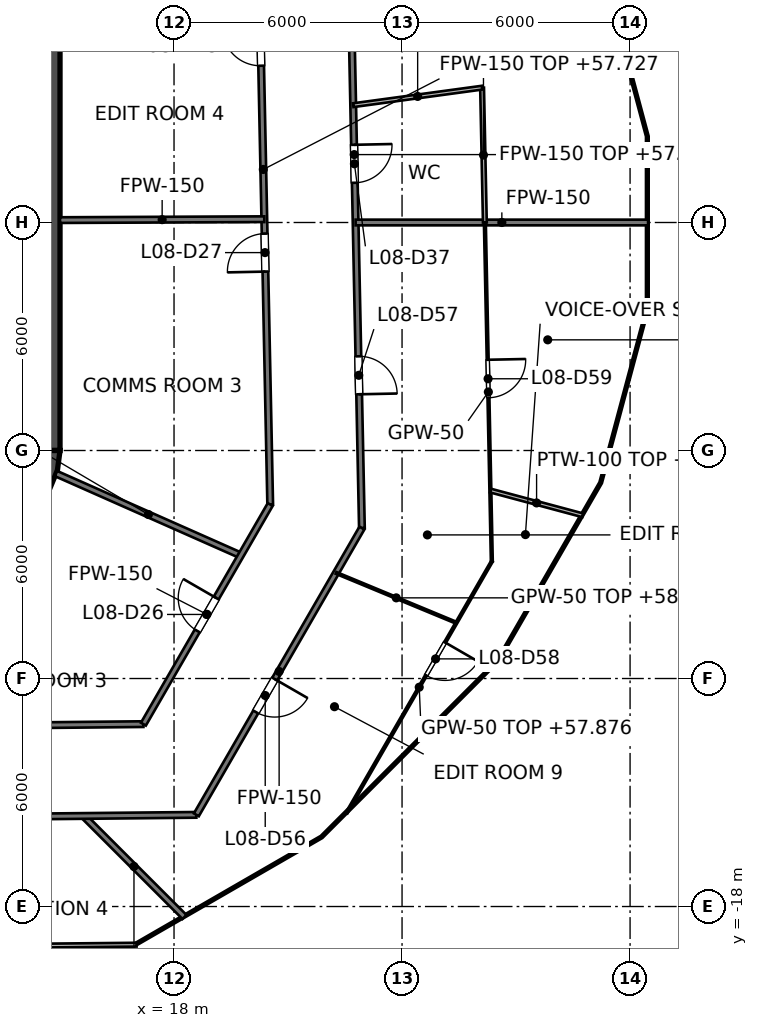
"""IFC4 building model, lengths in metres.
Left out: names, types, materials, properties, quantities, classifications, styles, units other than length and angle.
Written with IfcOpenShell. Run it as: python <this file> out.ifc"""

import sys

from ifc_helpers import new_model, si_unit, direction, frame, frame_2d, origin, place, context, subcontext, project, spatial, polyline, rectangle, outline, extrude, element, fill, save


model = new_model("IFC4")
c1 = context("Model", 3, precision=1e-05, world=origin(), true_north=direction((0.0, 1.0)))
c2 = subcontext(c1, "Body", "Model", "MODEL_VIEW")
j1 = project(units=[si_unit("LENGTHUNIT", "METRE"), si_unit("PLANEANGLEUNIT", "RADIAN")], contexts=[c1])
p1 = place(None, origin())
s1 = spatial("IfcSite", under=j1, at=p1, CompositionType="ELEMENT")
p2 = place(p1, origin())
s2 = spatial("IfcBuilding", under=s1, at=p2, CompositionType="ELEMENT")
p3 = place(p2, frame((0.0, 0.0, 54.6)))
s3 = spatial("IfcBuildingStorey", under=s2, at=p3, CompositionType="ELEMENT", Elevation=54.6)
p4 = place(p3, frame((14.7, -6.0, 0.0), z_axis=(0.0, 0.0, 1.0), x_axis=(0.0, 1.0, 0.0)))
e1 = element("IfcWall", 1, at=p4, inside=s3, PredefinedType="SHEAR", context=c2, shape_type="SweptSolid", body=[
    extrude(rectangle(XDim=12.0, YDim=0.6, at=frame_2d((6.0, 0.0))), origin(), (0.0, 0.0, 1.0), 4.2),
])
p5 = place(p3, origin())
e2 = element("IfcWall", 2, at=p5, inside=s3, PredefinedType="SHEAR", context=c2, shape_type="SweptSolid", body=[
    extrude(outline(polyline([(15.0, -6.0), (14.395, -6.0), (14.347, -6.361), (14.208, -6.698), (13.986, -6.986), (13.698, -7.208), (13.361, -7.347), (13.0, -7.395), (13.0, -8.0), (13.518, -7.932), (14.0, -7.732), (14.414, -7.414), (14.732, -7.0), (14.932, -6.518), (15.0, -6.0)])), origin(), (0.0, 0.0, 1.0), 4.2),
])
p6 = place(p3, frame((20.167, 10.213, 0.0), z_axis=(0.0, 0.0, 1.0), x_axis=(0.020624730832, -0.999787287616, 0.0)))
e3 = element("IfcWall", 3, at=p6, inside=s3, PredefinedType="PARTITIONING", context=c2, shape_type="SweptSolid", body=[
    extrude(rectangle(XDim=17.637, YDim=0.15, at=frame_2d((8.819, 0.0))), origin(), (0.0, 0.0, 1.0), 3.127),
])
p7 = place(p6, frame((10.508, 0.0, 0.0)))
e4 = element("IfcOpeningElement", 4, at=p7, cuts=e3, PredefinedType="OPENING", context=c2, shape_type="SweptSolid", body=[
    extrude(rectangle(XDim=1.0, YDim=2.1, at=frame_2d((0.5, 1.05))), frame((0.0, 0.075, 0.0), z_axis=(0.0, -1.0, 0.0), x_axis=(1.0, 0.0, 0.0)), (0.0, 0.0, 1.0), 0.15),
])
p8 = place(p6, frame((5.089, 0.0, 0.0)))
e5 = element("IfcOpeningElement", 5, at=p8, cuts=e3, PredefinedType="OPENING", context=c2, shape_type="SweptSolid", body=[
    extrude(rectangle(XDim=1.0, YDim=2.1, at=frame_2d((0.5, 1.05))), frame((0.0, 0.075, 0.0), z_axis=(0.0, -1.0, 0.0), x_axis=(1.0, 0.0, 0.0)), (0.0, 0.0, 1.0), 0.15),
])
p9 = place(p3, frame((22.539, 11.615, 0.0), z_axis=(0.0, 0.0, 1.0), x_axis=(0.020613919434, -0.999787510587, 0.0)))
e6 = element("IfcWall", 6, at=p9, inside=s3, PredefinedType="PARTITIONING", context=c2, shape_type="SweptSolid", body=[
    extrude(rectangle(XDim=19.66, YDim=0.15, at=frame_2d((9.83, 0.0))), origin(), (0.0, 0.0, 1.0), 3.127),
])
p10 = place(p9, frame((9.573, 0.0, 0.0)))
e7 = element("IfcOpeningElement", 7, at=p10, cuts=e6, PredefinedType="OPENING", context=c2, shape_type="SweptSolid", body=[
    extrude(rectangle(XDim=1.0, YDim=2.1, at=frame_2d((0.5, 1.05))), frame((0.0, 0.075, 0.0), z_axis=(0.0, -1.0, 0.0), x_axis=(1.0, 0.0, 0.0)), (0.0, 0.0, 1.0), 0.15),
])
p11 = place(p9, frame((15.139, 0.0, 0.0)))
e8 = element("IfcOpeningElement", 8, at=p11, cuts=e6, PredefinedType="OPENING", context=c2, shape_type="SweptSolid", body=[
    extrude(rectangle(XDim=1.0, YDim=2.1, at=frame_2d((0.5, 1.05))), frame((0.0, 0.075, 0.0), z_axis=(0.0, -1.0, 0.0), x_axis=(1.0, 0.0, 0.0)), (0.0, 0.0, 1.0), 0.15),
])
p12 = place(p3, frame((15.617, -15.617, 0.0), z_axis=(0.0, 0.0, 1.0), x_axis=(0.707106781187, -0.707106781187, 0.0)))
e9 = element("IfcWall", 9, at=p12, inside=s3, PredefinedType="PARTITIONING", context=c2, shape_type="SweptSolid", body=[
    extrude(rectangle(XDim=3.759, YDim=0.15, at=frame_2d((1.879, 0.0))), origin(), (0.0, 0.0, 1.0), 3.276),
])
p13 = place(p3, frame((14.895, -6.607, 0.0), z_axis=(0.0, 0.0, 1.0), x_axis=(0.914233271379, -0.405188259337, 0.0)))
e10 = element("IfcWall", 10, at=p13, inside=s3, PredefinedType="PARTITIONING", context=c2, shape_type="SweptSolid", body=[
    extrude(rectangle(XDim=5.317, YDim=0.15, at=frame_2d((2.659, 0.0))), origin(), (0.0, 0.0, 1.0), 3.276),
])
p14 = place(p3, frame((22.778, 0.0, 0.0), z_axis=(0.0, 0.0, 1.0), x_axis=(1.0, 0.0, 0.0)))
e11 = element("IfcWall", 11, at=p14, inside=s3, PredefinedType="PARTITIONING", context=c2, shape_type="SweptSolid", body=[
    extrude(rectangle(XDim=7.696, YDim=0.15, at=frame_2d((3.848, 0.0))), origin(), (0.0, 0.0, 1.0), 3.195),
])
p15 = place(p3, frame((15.0, 0.063, 0.0), z_axis=(0.0, 0.0, 1.0), x_axis=(0.999990294223, 0.004405843865, 0.0)))
e12 = element("IfcWall", 12, at=p15, inside=s3, PredefinedType="PARTITIONING", context=c2, shape_type="SweptSolid", body=[
    extrude(rectangle(XDim=5.375, YDim=0.15, at=frame_2d((2.688, 0.0))), origin(), (0.0, 0.0, 1.0), 3.195),
])
p16 = place(p3, frame((-14.534, -15.916, 0.0), z_axis=(0.0, 0.0, 1.0), x_axis=(0.99995085722, 0.009913785652, 0.0)))
e13 = element("IfcWall", 13, at=p16, inside=s3, PredefinedType="PARTITIONING", context=c2, shape_type="SweptSolid", body=[
    extrude(rectangle(XDim=33.123, YDim=0.15, at=frame_2d((16.561, 0.0))), origin(), (0.0, 0.0, 1.0), 3.127),
])
p17 = place(p16, frame((3.611, 0.0, 0.0)))
e14 = element("IfcOpeningElement", 14, at=p17, cuts=e13, PredefinedType="OPENING", context=c2, shape_type="SweptSolid", body=[
    extrude(rectangle(XDim=1.0, YDim=2.1, at=frame_2d((0.5, 1.05))), frame((0.0, 0.075, 0.0), z_axis=(0.0, -1.0, 0.0), x_axis=(1.0, 0.0, 0.0)), (0.0, 0.0, 1.0), 0.15),
])
p18 = place(p16, frame((10.927, 0.0, 0.0)))
e15 = element("IfcOpeningElement", 15, at=p18, cuts=e13, PredefinedType="OPENING", context=c2, shape_type="SweptSolid", body=[
    extrude(rectangle(XDim=1.0, YDim=2.1, at=frame_2d((0.5, 1.05))), frame((0.0, 0.075, 0.0), z_axis=(0.0, -1.0, 0.0), x_axis=(1.0, 0.0, 0.0)), (0.0, 0.0, 1.0), 0.15),
])
p19 = place(p16, frame((16.11, 0.0, 0.0)))
e16 = element("IfcOpeningElement", 16, at=p19, cuts=e13, PredefinedType="OPENING", context=c2, shape_type="SweptSolid", body=[
    extrude(rectangle(XDim=1.0, YDim=2.1, at=frame_2d((0.5, 1.05))), frame((0.0, 0.075, 0.0), z_axis=(0.0, -1.0, 0.0), x_axis=(1.0, 0.0, 0.0)), (0.0, 0.0, 1.0), 0.15),
])
p20 = place(p16, frame((19.56, 0.0, 0.0)))
e17 = element("IfcOpeningElement", 17, at=p20, cuts=e13, PredefinedType="OPENING", context=c2, shape_type="SweptSolid", body=[
    extrude(rectangle(XDim=1.0, YDim=2.1, at=frame_2d((0.5, 1.05))), frame((0.0, 0.075, 0.0), z_axis=(0.0, -1.0, 0.0), x_axis=(1.0, 0.0, 0.0)), (0.0, 0.0, 1.0), 0.15),
])
p21 = place(p16, frame((25.623, 0.0, 0.0)))
e18 = element("IfcOpeningElement", 18, at=p21, cuts=e13, PredefinedType="OPENING", context=c2, shape_type="SweptSolid", body=[
    extrude(rectangle(XDim=1.0, YDim=2.1, at=frame_2d((0.5, 1.05))), frame((0.0, 0.075, 0.0), z_axis=(0.0, -1.0, 0.0), x_axis=(1.0, 0.0, 0.0)), (0.0, 0.0, 1.0), 0.15),
])
p22 = place(p3, frame((11.9, -13.253, 0.0), z_axis=(0.0, 0.0, 1.0), x_axis=(0.999950853109, 0.009914200296, 0.0)))
e19 = element("IfcWall", 19, at=p22, inside=s3, PredefinedType="PARTITIONING", context=c2, shape_type="SweptSolid", body=[
    extrude(rectangle(XDim=5.294, YDim=0.15, at=frame_2d((2.647, 0.0))), origin(), (0.0, 0.0, 1.0), 3.276),
])
p23 = place(p3, frame((18.587, -15.587, 0.0), z_axis=(0.0, 0.0, 1.0), x_axis=(0.500026433136, 0.866010142069, 0.0)))
e20 = element("IfcWall", 20, at=p23, inside=s3, PredefinedType="PARTITIONING", context=c2, shape_type="SweptSolid", body=[
    extrude(rectangle(XDim=8.713, YDim=0.15, at=frame_2d((4.357, 0.0))), origin(), (0.0, 0.0, 1.0), 3.195),
])
p24 = place(p23, frame((3.125, 0.0, 0.0)))
e21 = element("IfcOpeningElement", 21, at=p24, cuts=e20, PredefinedType="OPENING", context=c2, shape_type="SweptSolid", body=[
    extrude(rectangle(XDim=1.0, YDim=2.1, at=frame_2d((0.5, 1.05))), frame((0.0, 0.075, 0.0), z_axis=(0.0, -1.0, 0.0), x_axis=(1.0, 0.0, 0.0)), (0.0, 0.0, 1.0), 0.15),
])
p25 = place(p3, frame((17.194, -13.201, 0.0), z_axis=(0.0, 0.0, 1.0), x_axis=(0.50001062018, 0.866019272134, 0.0)))
e22 = element("IfcWall", 22, at=p25, inside=s3, PredefinedType="PARTITIONING", context=c2, shape_type="SweptSolid", body=[
    extrude(rectangle(XDim=6.674, YDim=0.15, at=frame_2d((3.337, 0.0))), origin(), (0.0, 0.0, 1.0), 3.195),
])
p26 = place(p25, frame((2.833, 0.0, 0.0)))
e23 = element("IfcOpeningElement", 23, at=p26, cuts=e22, PredefinedType="OPENING", context=c2, shape_type="SweptSolid", body=[
    extrude(rectangle(XDim=1.0, YDim=2.1, at=frame_2d((0.5, 1.05))), frame((0.0, 0.075, 0.0), z_axis=(0.0, -1.0, 0.0), x_axis=(1.0, 0.0, 0.0)), (0.0, 0.0, 1.0), 0.15),
])
p27 = place(p3, frame((26.179, 0.0, 0.0), z_axis=(0.0, 0.0, 1.0), x_axis=(0.020525621248, -0.999789327245, 0.0)))
e24 = element("IfcWall", 24, at=p27, inside=s3, PredefinedType="PARTITIONING", context=c2, shape_type="SweptSolid", body=[
    extrude(rectangle(XDim=8.921, YDim=0.05, at=frame_2d((4.46, 0.0))), origin(), (0.0, 0.0, 1.0), 3.127),
])
p28 = place(p27, frame((3.613, 0.0, 0.0)))
e25 = element("IfcOpeningElement", 25, at=p28, cuts=e24, PredefinedType="OPENING", context=c2, shape_type="SweptSolid", body=[
    extrude(rectangle(XDim=1.0, YDim=2.1, at=frame_2d((0.5, 1.05))), frame((0.0, 0.025, 0.0), z_axis=(0.0, -1.0, 0.0), x_axis=(1.0, 0.0, 0.0)), (0.0, 0.0, 1.0), 0.05),
])
p29 = place(p3, frame((22.263, -9.221, 0.0), z_axis=(0.0, 0.0, 1.0), x_axis=(0.923799852488, -0.382875740342, 0.0)))
e26 = element("IfcWall", 26, at=p29, inside=s3, PredefinedType="PARTITIONING", context=c2, shape_type="SweptSolid", body=[
    extrude(rectangle(XDim=3.429, YDim=0.05, at=frame_2d((1.715, 0.0))), origin(), (0.0, 0.0, 1.0), 4.05),
])
p30 = place(p3, frame((22.541, -15.539, 0.0), z_axis=(0.0, 0.0, 1.0), x_axis=(0.499927963764, 0.86606698993, 0.0)))
e27 = element("IfcWall", 27, at=p30, inside=s3, PredefinedType="PARTITIONING", context=c2, shape_type="SweptSolid", body=[
    extrude(rectangle(XDim=7.644, YDim=0.05, at=frame_2d((3.822, 0.0))), origin(), (0.0, 0.0, 1.0), 3.276),
])
p31 = place(p30, frame((4.183, 0.0, 0.0)))
e28 = element("IfcOpeningElement", 28, at=p31, cuts=e27, PredefinedType="OPENING", context=c2, shape_type="SweptSolid", body=[
    extrude(rectangle(XDim=1.0, YDim=2.1, at=frame_2d((0.5, 1.05))), frame((0.0, 0.025, 0.0), z_axis=(0.0, -1.0, 0.0), x_axis=(1.0, 0.0, 0.0)), (0.0, 0.0, 1.0), 0.05),
])
p32 = place(p3, frame((26.106, 3.548, 0.0), z_axis=(0.0, 0.0, 1.0), x_axis=(0.020569513461, -0.999788425176, 0.0)))
e29 = element("IfcWall", 29, at=p32, inside=s3, PredefinedType="PARTITIONING", context=c2, shape_type="SweptSolid", body=[
    extrude(rectangle(XDim=3.549, YDim=0.1, at=frame_2d((1.774, 0.0))), origin(), (0.0, 0.0, 1.0), 3.127),
])
p33 = place(p3, frame((26.325, -7.054, 0.0), z_axis=(0.0, 0.0, 1.0), x_axis=(0.965923359086, -0.258828252656, 0.0)))
e30 = element("IfcWall", 30, at=p33, inside=s3, PredefinedType="PARTITIONING", context=c2, shape_type="SweptSolid", body=[
    extrude(rectangle(XDim=2.516, YDim=0.1, at=frame_2d((1.258, 0.0))), origin(), (0.0, 0.0, 1.0), 3.727),
])
p34 = place(p3, frame((-15.194, -19.323, 0.0), z_axis=(0.0, 0.0, 1.0), x_axis=(0.999950927115, 0.009906733132, 0.0)))
e31 = element("IfcWall", 31, at=p34, inside=s3, PredefinedType="PARTITIONING", context=c2, shape_type="SweptSolid", body=[
    extrude(rectangle(XDim=32.209, YDim=0.1, at=frame_2d((16.105, 0.0))), origin(), (0.0, 0.0, 1.0), 3.127),
])
p35 = place(p34, frame((6.542, 0.0, 0.0)))
e32 = element("IfcOpeningElement", 32, at=p35, cuts=e31, PredefinedType="OPENING", context=c2, shape_type="SweptSolid", body=[
    extrude(rectangle(XDim=0.9, YDim=2.1, at=frame_2d((0.45, 1.05))), frame((0.0, 0.05, 0.0), z_axis=(0.0, -1.0, 0.0), x_axis=(1.0, 0.0, 0.0)), (0.0, 0.0, 1.0), 0.1),
])
p36 = place(p34, frame((25.686, 0.0, 0.0)))
e33 = element("IfcOpeningElement", 33, at=p36, cuts=e31, PredefinedType="OPENING", context=c2, shape_type="SweptSolid", body=[
    extrude(rectangle(XDim=0.9, YDim=2.1, at=frame_2d((0.45, 1.05))), frame((0.0, 0.05, 0.0), z_axis=(0.0, -1.0, 0.0), x_axis=(1.0, 0.0, 0.0)), (0.0, 0.0, 1.0), 0.1),
])
p37 = place(p3, frame((22.715, 3.087, 0.0), z_axis=(0.0, 0.0, 1.0), x_axis=(0.990877427827, 0.134766179075, 0.0)))
e34 = element("IfcWall", 34, at=p37, inside=s3, PredefinedType="PARTITIONING", context=c2, shape_type="SweptSolid", body=[
    extrude(rectangle(XDim=3.422, YDim=0.1, at=frame_2d((1.711, 0.0))), origin(), (0.0, 0.0, 1.0), 4.05),
])
p38 = place(p26, origin())
e35 = element("IfcDoor", 35, at=p38, inside=s3, OperationType="SINGLE_SWING_RIGHT", PredefinedType="DOOR", context=c2, shape_type="SweptSolid", body=[
    extrude(rectangle(XDim=1.0, YDim=2.1, at=frame_2d((0.5, 1.05))), frame((0.0, 0.025, 0.0), z_axis=(0.0, -1.0, 0.0), x_axis=(1.0, 0.0, 0.0)), (0.0, 0.0, 1.0), 0.05),
])
fill(e23, e35)
p39 = place(p7, origin())
e36 = element("IfcDoor", 36, at=p39, inside=s3, OperationType="SINGLE_SWING_RIGHT", PredefinedType="DOOR", context=c2, shape_type="SweptSolid", body=[
    extrude(rectangle(XDim=1.0, YDim=2.1, at=frame_2d((0.5, 1.05))), frame((0.0, 0.025, 0.0), z_axis=(0.0, -1.0, 0.0), x_axis=(1.0, 0.0, 0.0)), (0.0, 0.0, 1.0), 0.05),
])
fill(e4, e36)
p40 = place(p8, origin())
e37 = element("IfcDoor", 37, at=p40, inside=s3, OperationType="SINGLE_SWING_LEFT", PredefinedType="DOOR", context=c2, shape_type="SweptSolid", body=[
    extrude(rectangle(XDim=1.0, YDim=2.1, at=frame_2d((0.5, 1.05))), frame((0.0, 0.025, 0.0), z_axis=(0.0, -1.0, 0.0), x_axis=(1.0, 0.0, 0.0)), (0.0, 0.0, 1.0), 0.05),
])
fill(e5, e37)
p41 = place(p10, origin())
e38 = element("IfcDoor", 38, at=p41, inside=s3, OperationType="SINGLE_SWING_LEFT", PredefinedType="DOOR", context=c2, shape_type="SweptSolid", body=[
    extrude(rectangle(XDim=1.0, YDim=2.1, at=frame_2d((0.5, 1.05))), frame((0.0, 0.025, 0.0), z_axis=(0.0, -1.0, 0.0), x_axis=(1.0, 0.0, 0.0)), (0.0, 0.0, 1.0), 0.05),
])
fill(e7, e38)
p42 = place(p24, origin())
e39 = element("IfcDoor", 39, at=p42, inside=s3, OperationType="SINGLE_SWING_RIGHT", PredefinedType="DOOR", context=c2, shape_type="SweptSolid", body=[
    extrude(rectangle(XDim=1.0, YDim=2.1, at=frame_2d((0.5, 1.05))), frame((0.0, 0.025, 0.0), z_axis=(0.0, -1.0, 0.0), x_axis=(1.0, 0.0, 0.0)), (0.0, 0.0, 1.0), 0.05),
])
fill(e21, e39)
p43 = place(p11, origin())
e40 = element("IfcDoor", 40, at=p43, inside=s3, OperationType="SINGLE_SWING_RIGHT", PredefinedType="DOOR", context=c2, shape_type="SweptSolid", body=[
    extrude(rectangle(XDim=1.0, YDim=2.1, at=frame_2d((0.5, 1.05))), frame((0.0, 0.025, 0.0), z_axis=(0.0, -1.0, 0.0), x_axis=(1.0, 0.0, 0.0)), (0.0, 0.0, 1.0), 0.05),
])
fill(e8, e40)
p44 = place(p31, origin())
e41 = element("IfcDoor", 41, at=p44, inside=s3, OperationType="SINGLE_SWING_RIGHT", PredefinedType="DOOR", context=c2, shape_type="SweptSolid", body=[
    extrude(rectangle(XDim=1.0, YDim=2.1, at=frame_2d((0.5, 1.05))), frame((0.0, 0.025, 0.0), z_axis=(0.0, -1.0, 0.0), x_axis=(1.0, 0.0, 0.0)), (0.0, 0.0, 1.0), 0.05),
])
fill(e28, e41)
p45 = place(p28, origin())
e42 = element("IfcDoor", 42, at=p45, inside=s3, OperationType="SINGLE_SWING_LEFT", PredefinedType="DOOR", context=c2, shape_type="SweptSolid", body=[
    extrude(rectangle(XDim=1.0, YDim=2.1, at=frame_2d((0.5, 1.05))), frame((0.0, 0.025, 0.0), z_axis=(0.0, -1.0, 0.0), x_axis=(1.0, 0.0, 0.0)), (0.0, 0.0, 1.0), 0.05),
])
fill(e25, e42)
save(model, sys.argv[1])
